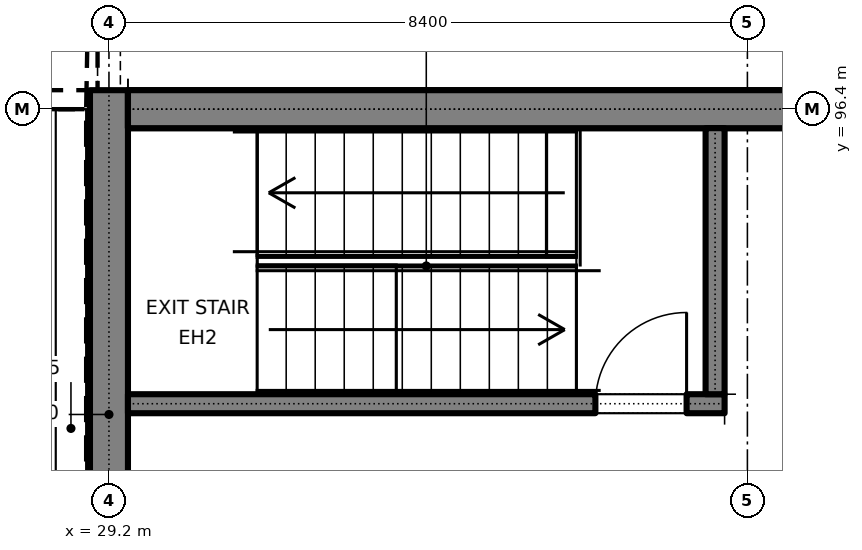
"""IFC4 building model, lengths in metres.
Left out: names, types, materials, properties, quantities, classifications, styles, units other than length and angle.
Written with IfcOpenShell. Run it as: python <this file> out.ifc"""

import sys

from ifc_helpers import new_model, si_unit, direction, frame, frame_2d, origin, place, context, subcontext, project, spatial, rectangle, extrude, element, fill, save


model = new_model("IFC4")
c1 = context("Model", 3, precision=1e-05, world=origin(), true_north=direction((0.0, 1.0)))
c2 = subcontext(c1, "Body", "Model", "MODEL_VIEW")
j1 = project(units=[si_unit("LENGTHUNIT", "METRE"), si_unit("PLANEANGLEUNIT", "RADIAN")], contexts=[c1])
p1 = place(None, origin())
s1 = spatial("IfcSite", under=j1, at=p1, CompositionType="ELEMENT")
p2 = place(p1, origin())
s2 = spatial("IfcBuilding", under=s1, at=p2, CompositionType="ELEMENT")
p3 = place(p2, frame((0.0, 0.0, 15.0)))
s3 = spatial("IfcBuildingStorey", under=s2, at=p3, CompositionType="ELEMENT", Elevation=15.0)
p4 = place(p3, frame((29.2, 54.15, 0.0), z_axis=(0.0, 0.0, 1.0), x_axis=(0.0, 1.0, 0.0)))
e1 = element("IfcWall", 1, at=p4, inside=s3, PredefinedType="SOLIDWALL", context=c2, shape_type="SweptSolid", body=[
    extrude(rectangle(XDim=42.5, YDim=0.5, at=frame_2d((21.25, 0.0))), origin(), (0.0, 0.0, 1.0), 4.2),
])
p5 = place(p3, frame((29.45, 96.4, 0.0), z_axis=(0.0, 0.0, 1.0), x_axis=(1.0, 0.0, 0.0)))
e2 = element("IfcWall", 2, at=p5, inside=s3, PredefinedType="SOLIDWALL", context=c2, shape_type="SweptSolid", body=[
    extrude(rectangle(XDim=10.25, YDim=0.5, at=frame_2d((5.125, 0.0))), origin(), (0.0, 0.0, 1.0), 3.0),
])
p6 = place(p3, frame((29.45, 96.4, 3.0), z_axis=(0.0, 0.0, 1.0), x_axis=(1.0, 0.0, 0.0)))
e3 = element("IfcWall", 3, at=p6, inside=s3, PredefinedType="SOLIDWALL", context=c2, shape_type="SweptSolid", body=[
    extrude(rectangle(XDim=66.7, YDim=0.5, at=frame_2d((33.35, 0.0))), origin(), (0.0, 0.0, 1.0), 1.2),
])
p7 = place(p3, frame((29.45, 92.525, 0.0), z_axis=(0.0, 0.0, 1.0), x_axis=(1.0, 0.0, 0.0)))
e4 = element("IfcWall", 4, at=p7, inside=s3, PredefinedType="SOLIDWALL", context=c2, shape_type="SweptSolid", body=[
    extrude(rectangle(XDim=7.85, YDim=0.25, at=frame_2d((3.925, 0.0))), origin(), (0.0, 0.0, 1.0), 4.2),
])
p8 = place(p7, frame((6.15, 0.0, 0.0)))
e5 = element("IfcOpeningElement", 5, at=p8, cuts=e4, PredefinedType="OPENING", context=c2, shape_type="SweptSolid", body=[
    extrude(rectangle(XDim=1.2, YDim=2.1, at=frame_2d((0.6, 1.05))), frame((0.0, 0.135, 0.0), z_axis=(0.0, -1.0, 0.0), x_axis=(1.0, 0.0, 0.0)), (0.0, 0.0, 1.0), 0.27),
])
p9 = place(p3, frame((37.175, 92.65, 0.0), z_axis=(0.0, 0.0, 1.0), x_axis=(0.0, 1.0, 0.0)))
e6 = element("IfcWall", 6, at=p9, inside=s3, PredefinedType="SOLIDWALL", context=c2, shape_type="SweptSolid", body=[
    extrude(rectangle(XDim=3.5, YDim=0.25, at=frame_2d((1.75, 0.0))), origin(), (0.0, 0.0, 1.0), 4.2),
])
p10 = place(p8, origin())
e7 = element("IfcDoor", 7, at=p10, inside=s3, OperationType="SINGLE_SWING_RIGHT", PredefinedType="DOOR", context=c2, shape_type="SweptSolid", body=[
    extrude(rectangle(XDim=1.2, YDim=2.1, at=frame_2d((0.6, 1.05))), frame((0.0, 0.025, 0.0), z_axis=(0.0, -1.0, 0.0), x_axis=(1.0, 0.0, 0.0)), (0.0, 0.0, 1.0), 0.05),
])
fill(e5, e7)
save(model, sys.argv[1])
